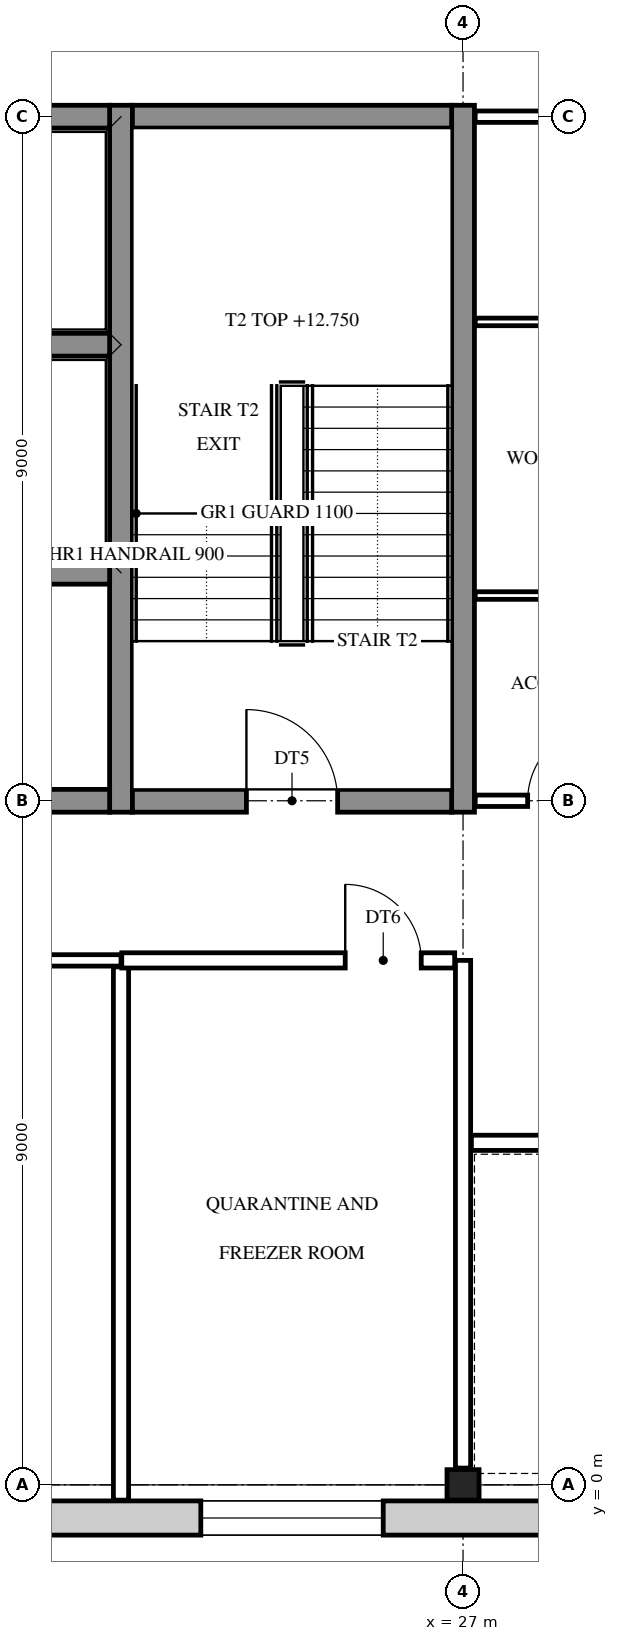
"""IFC4 building model, lengths in metres.
Left out: names, types, materials, properties, quantities, classifications, styles, units other than length and angle.
Written with IfcOpenShell. Run it as: python <this file> out.ifc"""

import sys

from ifc_helpers import new_model, si_unit, direction, frame, frame_2d, origin, origin_2d, place, context, subcontext, project, spatial, rectangle, i_section, extrude, element, fill, save


model = new_model("IFC4")
c1 = context("Model", 3, precision=1e-05, world=origin(), true_north=direction((0.0, 1.0)))
c2 = subcontext(c1, "Body", "Model", "MODEL_VIEW")
j1 = project(units=[si_unit("LENGTHUNIT", "METRE"), si_unit("PLANEANGLEUNIT", "RADIAN")], contexts=[c1])
p1 = place(None, origin())
s1 = spatial("IfcSite", under=j1, at=p1, CompositionType="ELEMENT")
p2 = place(p1, origin())
s2 = spatial("IfcBuilding", under=s1, at=p2, CompositionType="ELEMENT")
p3 = place(p2, frame((0.0, 0.0, 10.5)))
s3 = spatial("IfcBuildingStorey", under=s2, at=p3, CompositionType="ELEMENT", Elevation=10.5)
p4 = place(p3, frame((27.0, 0.0, 0.0), z_axis=(0.0, 0.0, 1.0), x_axis=(0.0, 1.0, 0.0)))
e1 = element("IfcColumn", 1, at=p4, inside=s3, PredefinedType="COLUMN", context=c2, shape_type="SweptSolid", body=[
    extrude(i_section(OverallWidth=0.4, OverallDepth=0.422, WebThickness=0.028, FlangeThickness=0.036, at=origin_2d()), origin(), (0.0, 0.0, 1.0), 4.5),
])
for number, where, z_axis, x_axis in (
    (2, (22.5, 8.85, 0.0), (0.0, 0.0, 1.0), (0.0, 1.0, 0.0)),
    (3, (27.0, 8.85, 0.0), (0.0, 0.0, 1.0), (0.0, 1.0, 0.0)),
):
    element("IfcWall", number, at=place(p3, frame(where, z_axis=z_axis, x_axis=x_axis)), inside=s3, PredefinedType="SHEAR", context=c2, shape_type="SweptSolid", body=[
        extrude(rectangle(XDim=9.3, YDim=0.3, at=frame_2d((4.65, 0.0))), origin(), (0.0, 0.0, 1.0), 4.5),
    ])
p5 = place(p3, frame((19.65, 9.0, 0.0), z_axis=(0.0, 0.0, 1.0), x_axis=(1.0, 0.0, 0.0)))
e4 = element("IfcWall", 4, at=p5, inside=s3, PredefinedType="SHEAR", context=c2, shape_type="SweptSolid", body=[
    extrude(rectangle(XDim=2.7, YDim=0.3, at=frame_2d((1.35, 0.0))), origin(), (0.0, 0.0, 1.0), 4.5),
])
p6 = place(p3, frame((22.65, 9.0, 0.0), z_axis=(0.0, 0.0, 1.0), x_axis=(1.0, 0.0, 0.0)))
e5 = element("IfcWall", 5, at=p6, inside=s3, PredefinedType="SHEAR", context=c2, shape_type="SweptSolid", body=[
    extrude(rectangle(XDim=4.2, YDim=0.3, at=frame_2d((2.1, 0.0))), origin(), (0.0, 0.0, 1.0), 4.5),
])
p7 = place(p6, frame((1.5, 0.0, 0.0)))
e6 = element("IfcOpeningElement", 6, at=p7, cuts=e5, PredefinedType="OPENING", context=c2, shape_type="SweptSolid", body=[
    extrude(rectangle(XDim=1.2, YDim=2.1, at=frame_2d((0.6, 1.05))), frame((0.0, 0.16, 0.0), z_axis=(0.0, -1.0, 0.0), x_axis=(1.0, 0.0, 0.0)), (0.0, 0.0, 1.0), 0.32),
])
for number, where, z_axis, x_axis in (
    (7, (19.65, 12.0, 0.0), (0.0, 0.0, 1.0), (1.0, 0.0, 0.0)),
    (8, (19.65, 15.0, 0.0), (0.0, 0.0, 1.0), (1.0, 0.0, 0.0)),
    (9, (19.65, 18.0, 0.0), (0.0, 0.0, 1.0), (1.0, 0.0, 0.0)),
):
    element("IfcWall", number, at=place(p3, frame(where, z_axis=z_axis, x_axis=x_axis)), inside=s3, PredefinedType="SHEAR", context=c2, shape_type="SweptSolid", body=[
        extrude(rectangle(XDim=2.7, YDim=0.3, at=frame_2d((1.35, 0.0))), origin(), (0.0, 0.0, 1.0), 4.5),
    ])
p8 = place(p3, frame((22.65, 18.0, 0.0), z_axis=(0.0, 0.0, 1.0), x_axis=(1.0, 0.0, 0.0)))
e10 = element("IfcWall", 10, at=p8, inside=s3, PredefinedType="SHEAR", context=c2, shape_type="SweptSolid", body=[
    extrude(rectangle(XDim=4.2, YDim=0.3, at=frame_2d((2.1, 0.0))), origin(), (0.0, 0.0, 1.0), 4.5),
])
p9 = place(p3, frame((32.15, -0.436, 0.0), z_axis=(0.0, 0.0, 1.0), x_axis=(-1.0, 0.0, 0.0)))
e11 = element("IfcWall", 11, at=p9, inside=s3, PredefinedType="STANDARD", context=c2, shape_type="SweptSolid", body=[
    extrude(rectangle(XDim=32.8, YDim=0.45, at=frame_2d((16.4, 0.0))), origin(), (0.0, 0.0, 1.0), 4.5),
])
p10 = place(p9, frame((28.7, 0.0, 0.9)))
e12 = element("IfcOpeningElement", 12, at=p10, cuts=e11, PredefinedType="OPENING", context=c2, shape_type="SweptSolid", body=[
    extrude(rectangle(XDim=2.4, YDim=2.8, at=frame_2d((1.2, 1.4))), frame((0.0, 0.235, 0.0), z_axis=(0.0, -1.0, 0.0), x_axis=(1.0, 0.0, 0.0)), (0.0, 0.0, 1.0), 0.47),
])
p11 = place(p9, frame((24.2, 0.0, 0.9)))
e13 = element("IfcOpeningElement", 13, at=p11, cuts=e11, PredefinedType="OPENING", context=c2, shape_type="SweptSolid", body=[
    extrude(rectangle(XDim=2.4, YDim=2.8, at=frame_2d((1.2, 1.4))), frame((0.0, 0.235, 0.0), z_axis=(0.0, -1.0, 0.0), x_axis=(1.0, 0.0, 0.0)), (0.0, 0.0, 1.0), 0.47),
])
p12 = place(p9, frame((19.7, 0.0, 0.9)))
e14 = element("IfcOpeningElement", 14, at=p12, cuts=e11, PredefinedType="OPENING", context=c2, shape_type="SweptSolid", body=[
    extrude(rectangle(XDim=2.4, YDim=2.8, at=frame_2d((1.2, 1.4))), frame((0.0, 0.235, 0.0), z_axis=(0.0, -1.0, 0.0), x_axis=(1.0, 0.0, 0.0)), (0.0, 0.0, 1.0), 0.47),
])
p13 = place(p9, frame((15.2, 0.0, 0.9)))
e15 = element("IfcOpeningElement", 15, at=p13, cuts=e11, PredefinedType="OPENING", context=c2, shape_type="SweptSolid", body=[
    extrude(rectangle(XDim=2.4, YDim=2.8, at=frame_2d((1.2, 1.4))), frame((0.0, 0.235, 0.0), z_axis=(0.0, -1.0, 0.0), x_axis=(1.0, 0.0, 0.0)), (0.0, 0.0, 1.0), 0.47),
])
p14 = place(p9, frame((10.7, 0.0, 0.9)))
e16 = element("IfcOpeningElement", 16, at=p14, cuts=e11, PredefinedType="OPENING", context=c2, shape_type="SweptSolid", body=[
    extrude(rectangle(XDim=2.4, YDim=2.8, at=frame_2d((1.2, 1.4))), frame((0.0, 0.235, 0.0), z_axis=(0.0, -1.0, 0.0), x_axis=(1.0, 0.0, 0.0)), (0.0, 0.0, 1.0), 0.47),
])
p15 = place(p9, frame((6.2, 0.0, 0.9)))
e17 = element("IfcOpeningElement", 17, at=p15, cuts=e11, PredefinedType="OPENING", context=c2, shape_type="SweptSolid", body=[
    extrude(rectangle(XDim=2.4, YDim=2.8, at=frame_2d((1.2, 1.4))), frame((0.0, 0.235, 0.0), z_axis=(0.0, -1.0, 0.0), x_axis=(1.0, 0.0, 0.0)), (0.0, 0.0, 1.0), 0.47),
])
p16 = place(p9, frame((1.7, 0.0, 0.9)))
e18 = element("IfcOpeningElement", 18, at=p16, cuts=e11, PredefinedType="OPENING", context=c2, shape_type="SweptSolid", body=[
    extrude(rectangle(XDim=2.4, YDim=2.8, at=frame_2d((1.2, 1.4))), frame((0.0, 0.235, 0.0), z_axis=(0.0, -1.0, 0.0), x_axis=(1.0, 0.0, 0.0)), (0.0, 0.0, 1.0), 0.47),
])
p17 = place(p3, frame((22.5, -0.201, 0.0), z_axis=(0.0, 0.0, 1.0), x_axis=(0.0, 1.0, 0.0)))
e19 = element("IfcWall", 19, at=p17, inside=s3, PredefinedType="PARTITIONING", context=c2, shape_type="SweptSolid", body=[
    extrude(rectangle(XDim=7.016, YDim=0.2, at=frame_2d((3.508, 0.0))), origin(), (0.0, 0.0, 1.0), 3.822),
])
p18 = place(p3, frame((27.0, 0.221, 0.0), z_axis=(0.0, 0.0, 1.0), x_axis=(0.0, 1.0, 0.0)))
e20 = element("IfcWall", 20, at=p18, inside=s3, PredefinedType="PARTITIONING", context=c2, shape_type="SweptSolid", body=[
    extrude(rectangle(XDim=6.679, YDim=0.2, at=frame_2d((3.339, 0.0))), origin(), (0.0, 0.0, 1.0), 3.822),
])
p19 = place(p3, frame((27.11, 4.5, 0.0), z_axis=(0.0, 0.0, 1.0), x_axis=(1.0, 0.0, 0.0)))
e21 = element("IfcWall", 21, at=p19, inside=s3, PredefinedType="PARTITIONING", context=c2, shape_type="SweptSolid", body=[
    extrude(rectangle(XDim=4.58, YDim=0.2, at=frame_2d((2.29, 0.0))), origin(), (0.0, 0.0, 1.0), 3.822),
])
p20 = place(p19, frame((1.64, 0.0, 0.0)))
e22 = element("IfcOpeningElement", 22, at=p20, cuts=e21, PredefinedType="OPENING", context=c2, shape_type="SweptSolid", body=[
    extrude(rectangle(XDim=1.0, YDim=2.1, at=frame_2d((0.5, 1.05))), frame((0.0, 0.11, 0.0), z_axis=(0.0, -1.0, 0.0), x_axis=(1.0, 0.0, 0.0)), (0.0, 0.0, 1.0), 0.22),
])
p21 = place(p3, frame((6.9, 6.9, 0.0), z_axis=(0.0, 0.0, 1.0), x_axis=(1.0, 0.0, 0.0)))
e23 = element("IfcWall", 23, at=p21, inside=s3, PredefinedType="PARTITIONING", context=c2, shape_type="SweptSolid", body=[
    extrude(rectangle(XDim=15.6, YDim=0.15, at=frame_2d((7.8, 0.0))), origin(), (0.0, 0.0, 1.0), 3.822),
])
p22 = place(p21, frame((0.15, 0.0, 0.0)))
e24 = element("IfcOpeningElement", 24, at=p22, cuts=e23, PredefinedType="OPENING", context=c2, shape_type="SweptSolid", body=[
    extrude(rectangle(XDim=1.0, YDim=2.1, at=frame_2d((0.5, 1.05))), frame((0.0, 0.085, 0.0), z_axis=(0.0, -1.0, 0.0), x_axis=(1.0, 0.0, 0.0)), (0.0, 0.0, 1.0), 0.17),
])
p23 = place(p21, frame((11.725, 0.0, 0.0)))
e25 = element("IfcOpeningElement", 25, at=p23, cuts=e23, PredefinedType="OPENING", context=c2, shape_type="SweptSolid", body=[
    extrude(rectangle(XDim=1.0, YDim=2.1, at=frame_2d((0.5, 1.05))), frame((0.0, 0.085, 0.0), z_axis=(0.0, -1.0, 0.0), x_axis=(1.0, 0.0, 0.0)), (0.0, 0.0, 1.0), 0.17),
])
p24 = place(p21, frame((4.975, 0.0, 0.0)))
e26 = element("IfcOpeningElement", 26, at=p24, cuts=e23, PredefinedType="OPENING", context=c2, shape_type="SweptSolid", body=[
    extrude(rectangle(XDim=1.0, YDim=2.1, at=frame_2d((0.5, 1.05))), frame((0.0, 0.085, 0.0), z_axis=(0.0, -1.0, 0.0), x_axis=(1.0, 0.0, 0.0)), (0.0, 0.0, 1.0), 0.17),
])
p25 = place(p3, frame((22.51, 6.9, 0.0), z_axis=(0.0, 0.0, 1.0), x_axis=(1.0, 0.0, 0.0)))
e27 = element("IfcWall", 27, at=p25, inside=s3, PredefinedType="PARTITIONING", context=c2, shape_type="SweptSolid", body=[
    extrude(rectangle(XDim=4.38, YDim=0.2, at=frame_2d((2.19, 0.0))), origin(), (0.0, 0.0, 1.0), 3.822),
])
p26 = place(p25, frame((2.94, 0.0, 0.0)))
e28 = element("IfcOpeningElement", 28, at=p26, cuts=e27, PredefinedType="OPENING", context=c2, shape_type="SweptSolid", body=[
    extrude(rectangle(XDim=1.0, YDim=2.1, at=frame_2d((0.5, 1.05))), frame((0.0, 0.11, 0.0), z_axis=(0.0, -1.0, 0.0), x_axis=(1.0, 0.0, 0.0)), (0.0, 0.0, 1.0), 0.22),
])
p27 = place(p3, frame((27.16, 9.0, 0.0), z_axis=(0.0, 0.0, 1.0), x_axis=(1.0, 0.0, 0.0)))
e29 = element("IfcWall", 29, at=p27, inside=s3, PredefinedType="PARTITIONING", context=c2, shape_type="SweptSolid", body=[
    extrude(rectangle(XDim=2.455, YDim=0.15, at=frame_2d((1.228, 0.0))), origin(), (0.0, 0.0, 1.0), 3.822),
])
p28 = place(p27, frame((0.69, 0.0, 0.0)))
e30 = element("IfcOpeningElement", 30, at=p28, cuts=e29, PredefinedType="OPENING", context=c2, shape_type="SweptSolid", body=[
    extrude(rectangle(XDim=1.0, YDim=2.1, at=frame_2d((0.5, 1.05))), frame((0.0, 0.085, 0.0), z_axis=(0.0, -1.0, 0.0), x_axis=(1.0, 0.0, 0.0)), (0.0, 0.0, 1.0), 0.17),
])
for number, where, z_axis, x_axis in (
    (31, (27.16, 11.7, 0.0), (0.0, 0.0, 1.0), (1.0, 0.0, 0.0)),
    (32, (27.16, 15.3, 0.0), (0.0, 0.0, 1.0), (1.0, 0.0, 0.0)),
):
    element("IfcWall", number, at=place(p3, frame(where, z_axis=z_axis, x_axis=x_axis)), inside=s3, PredefinedType="PARTITIONING", context=c2, shape_type="SweptSolid", body=[
        extrude(rectangle(XDim=2.455, YDim=0.1, at=frame_2d((1.228, 0.0))), origin(), (0.0, 0.0, 1.0), 3.822),
    ])
p29 = place(p3, frame((27.16, 18.0, 0.0), z_axis=(0.0, 0.0, 1.0), x_axis=(1.0, 0.0, 0.0)))
e33 = element("IfcWall", 33, at=p29, inside=s3, PredefinedType="PARTITIONING", context=c2, shape_type="SweptSolid", body=[
    extrude(rectangle(XDim=4.13, YDim=0.15, at=frame_2d((2.065, 0.0))), origin(), (0.0, 0.0, 1.0), 3.822),
])
p30 = place(p15, origin())
e34 = element("IfcWindow", 34, at=p30, inside=s3, PartitioningType="SINGLE_PANEL", PredefinedType="WINDOW", context=c2, shape_type="SweptSolid", body=[
    extrude(rectangle(XDim=2.4, YDim=2.8, at=frame_2d((1.2, 1.4))), frame((0.0, 0.03, 0.0), z_axis=(0.0, -1.0, 0.0), x_axis=(1.0, 0.0, 0.0)), (0.0, 0.0, 1.0), 0.06),
])
fill(e17, e34)
p31 = place(p7, origin())
e35 = element("IfcDoor", 35, at=p31, inside=s3, OperationType="SINGLE_SWING_LEFT", PredefinedType="DOOR", context=c2, shape_type="SweptSolid", body=[
    extrude(rectangle(XDim=1.2, YDim=2.1, at=frame_2d((0.6, 1.05))), frame((0.0, 0.025, 0.0), z_axis=(0.0, -1.0, 0.0), x_axis=(1.0, 0.0, 0.0)), (0.0, 0.0, 1.0), 0.05),
])
fill(e6, e35)
p32 = place(p28, origin())
e36 = element("IfcDoor", 36, at=p32, inside=s3, OperationType="SINGLE_SWING_RIGHT", PredefinedType="DOOR", context=c2, shape_type="SweptSolid", body=[
    extrude(rectangle(XDim=1.0, YDim=2.1, at=frame_2d((0.5, 1.05))), frame((0.0, 0.025, 0.0), z_axis=(0.0, -1.0, 0.0), x_axis=(1.0, 0.0, 0.0)), (0.0, 0.0, 1.0), 0.05),
])
fill(e30, e36)
p33 = place(p26, frame((1.0, 0.0, 0.0), z_axis=(0.0, 0.0, 1.0), x_axis=(-1.0, 0.0, 0.0)))
e37 = element("IfcDoor", 37, at=p33, inside=s3, OperationType="SINGLE_SWING_LEFT", PredefinedType="DOOR", context=c2, shape_type="SweptSolid", body=[
    extrude(rectangle(XDim=1.0, YDim=2.1, at=frame_2d((0.5, 1.05))), frame((0.0, 0.025, 0.0), z_axis=(0.0, -1.0, 0.0), x_axis=(1.0, 0.0, 0.0)), (0.0, 0.0, 1.0), 0.05),
])
fill(e28, e37)
save(model, sys.argv[1])
